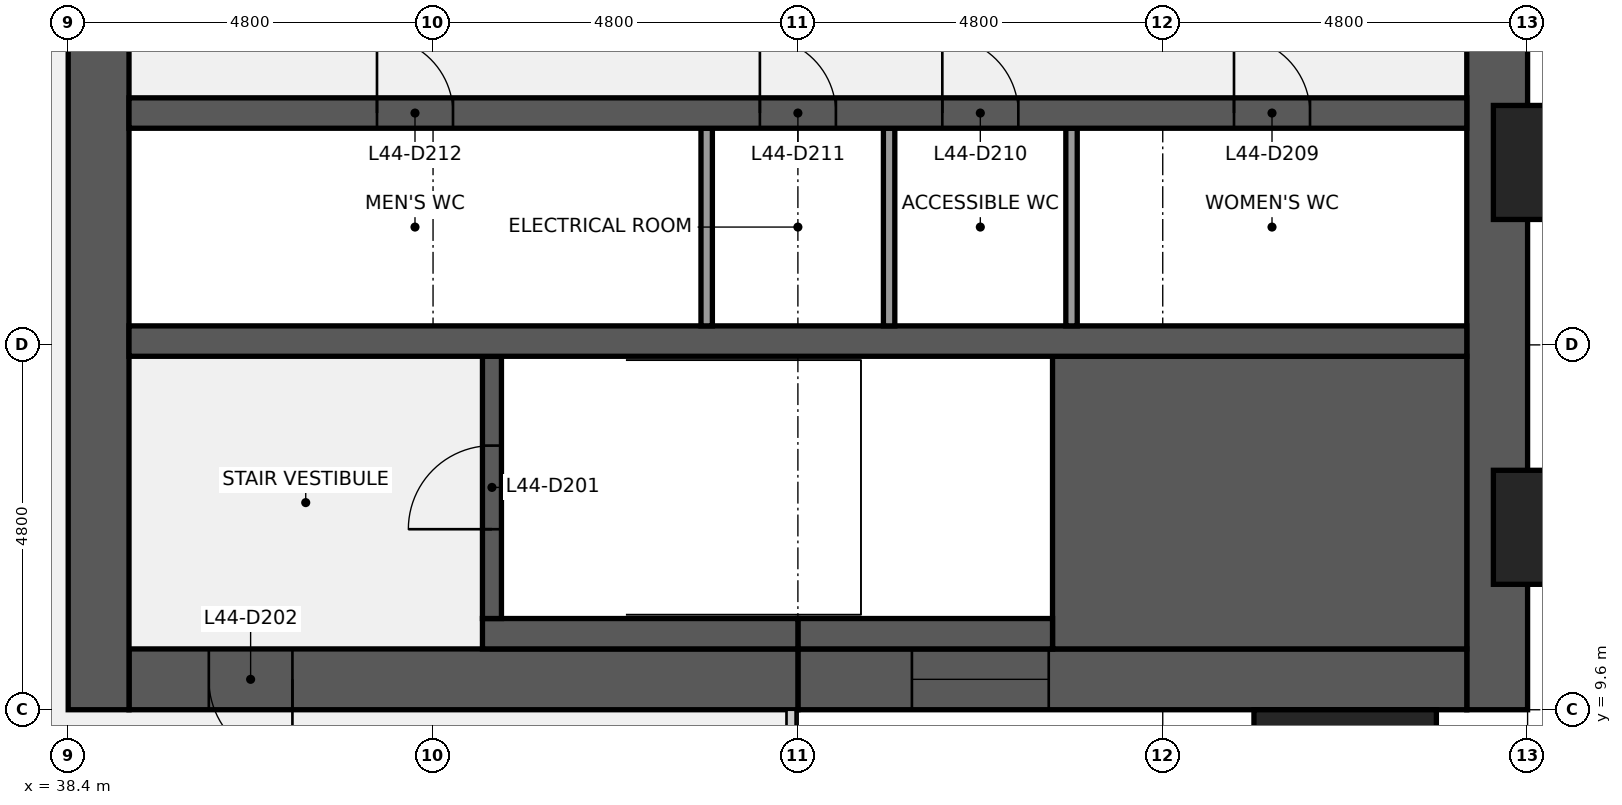
"""IFC4 building model, lengths in metres.
Left out: names, types, materials, properties, quantities, classifications, styles, units other than length and angle.
Written with IfcOpenShell. Run it as: python <this file> out.ifc"""

import sys

from ifc_helpers import new_model, si_unit, direction, frame, frame_2d, origin, origin_2d, place, context, subcontext, project, spatial, rectangle, extrude, element, fill, save


model = new_model("IFC4")
c1 = context("Model", 3, precision=1e-05, world=origin(), true_north=direction((0.0, 1.0)))
c2 = subcontext(c1, "Body", "Model", "MODEL_VIEW")
j1 = project(units=[si_unit("LENGTHUNIT", "METRE"), si_unit("PLANEANGLEUNIT", "RADIAN")], contexts=[c1])
p1 = place(None, origin())
s1 = spatial("IfcSite", under=j1, at=p1, CompositionType="ELEMENT")
p2 = place(p1, origin())
s2 = spatial("IfcBuilding", under=s1, at=p2, CompositionType="ELEMENT")
p3 = place(p2, frame((0.0, 0.0, 205.2)))
s3 = spatial("IfcBuildingStorey", under=s2, at=p3, CompositionType="ELEMENT", Elevation=205.2)
p4 = place(p3, frame((57.2, 38.4, 0.0), z_axis=(0.0, 0.0, 1.0), x_axis=(0.0, -1.0, 0.0)))
e1 = element("IfcWall", 1, at=p4, inside=s3, PredefinedType="SHEAR", context=c2, shape_type="SweptSolid", body=[
    extrude(rectangle(XDim=28.8, YDim=0.8, at=frame_2d((14.4, 0.0))), origin(), (0.0, 0.0, 1.0), 3.84),
])
p5 = place(p4, frame((18.45, 0.0, 0.9)))
e2 = element("IfcOpeningElement", 2, at=p5, cuts=e1, PredefinedType="OPENING", context=c2, shape_type="SweptSolid", body=[
    extrude(rectangle(XDim=1.5, YDim=1.5, at=frame_2d((0.75, 0.75))), frame((0.0, 0.41, 0.0), z_axis=(0.0, -1.0, 0.0), x_axis=(1.0, 0.0, 0.0)), (0.0, 0.0, 1.0), 0.82),
])
p6 = place(p4, frame((8.85, 0.0, 0.9)))
e3 = element("IfcOpeningElement", 3, at=p6, cuts=e1, PredefinedType="OPENING", context=c2, shape_type="SweptSolid", body=[
    extrude(rectangle(XDim=1.5, YDim=1.5, at=frame_2d((0.75, 0.75))), frame((0.0, 0.41, 0.0), z_axis=(0.0, -1.0, 0.0), x_axis=(1.0, 0.0, 0.0)), (0.0, 0.0, 1.0), 0.82),
])
p7 = place(p3, frame((56.8, 10.0, 0.0), z_axis=(0.0, 0.0, 1.0), x_axis=(-1.0, 0.0, 0.0)))
e4 = element("IfcWall", 4, at=p7, inside=s3, PredefinedType="SHEAR", context=c2, shape_type="SweptSolid", body=[
    extrude(rectangle(XDim=8.8, YDim=0.8, at=frame_2d((4.4, 0.0))), origin(), (0.0, 0.0, 1.0), 3.84),
])
p8 = place(p7, frame((5.5, 0.0, 0.9)))
e5 = element("IfcOpeningElement", 5, at=p8, cuts=e4, PredefinedType="OPENING", context=c2, shape_type="SweptSolid", body=[
    extrude(rectangle(XDim=1.8, YDim=1.5, at=frame_2d((0.9, 0.75))), frame((0.0, 0.41, 0.0), z_axis=(0.0, -1.0, 0.0), x_axis=(1.0, 0.0, 0.0)), (0.0, 0.0, 1.0), 0.82),
])
p9 = place(p3, frame((48.0, 10.0, 0.0), z_axis=(0.0, 0.0, 1.0), x_axis=(-1.0, 0.0, 0.0)))
e6 = element("IfcWall", 6, at=p9, inside=s3, PredefinedType="SHEAR", context=c2, shape_type="SweptSolid", body=[
    extrude(rectangle(XDim=8.8, YDim=0.8, at=frame_2d((4.4, 0.0))), origin(), (0.0, 0.0, 1.0), 3.84),
])
p10 = place(p9, frame((6.65, 0.0, 0.0)))
e7 = element("IfcOpeningElement", 7, at=p10, cuts=e6, PredefinedType="OPENING", context=c2, shape_type="SweptSolid", body=[
    extrude(rectangle(XDim=1.1, YDim=2.1, at=frame_2d((0.55, 1.05))), frame((0.0, 0.41, 0.0), z_axis=(0.0, -1.0, 0.0), x_axis=(1.0, 0.0, 0.0)), (0.0, 0.0, 1.0), 0.82),
])
p11 = place(p3, frame((38.8, 9.6, 0.0), z_axis=(0.0, 0.0, 1.0), x_axis=(0.0, 1.0, 0.0)))
e8 = element("IfcWall", 8, at=p11, inside=s3, PredefinedType="SHEAR", context=c2, shape_type="SweptSolid", body=[
    extrude(rectangle(XDim=28.8, YDim=0.8, at=frame_2d((14.4, 0.0))), origin(), (0.0, 0.0, 1.0), 3.84),
])
p12 = place(p11, frame((8.7, 0.0, 0.0)))
e9 = element("IfcOpeningElement", 9, at=p12, cuts=e8, PredefinedType="OPENING", context=c2, shape_type="SweptSolid", body=[
    extrude(rectangle(XDim=1.8, YDim=2.1, at=frame_2d((0.9, 1.05))), frame((0.0, 0.41, 0.0), z_axis=(0.0, -1.0, 0.0), x_axis=(1.0, 0.0, 0.0)), (0.0, 0.0, 1.0), 0.82),
])
p13 = place(p11, frame((18.3, 0.0, 0.0)))
e10 = element("IfcOpeningElement", 10, at=p13, cuts=e8, PredefinedType="OPENING", context=c2, shape_type="SweptSolid", body=[
    extrude(rectangle(XDim=1.8, YDim=2.1, at=frame_2d((0.9, 1.05))), frame((0.0, 0.41, 0.0), z_axis=(0.0, -1.0, 0.0), x_axis=(1.0, 0.0, 0.0)), (0.0, 0.0, 1.0), 0.82),
])
p14 = place(p3, frame((51.35, 12.325, 0.0), z_axis=(0.0, 0.0, 1.0), x_axis=(1.0, 0.0, 0.0)))
e11 = element("IfcWall", 11, at=p14, inside=s3, PredefinedType="SHEAR", context=c2, shape_type="SweptSolid", body=[
    extrude(rectangle(XDim=5.45, YDim=3.85, at=frame_2d((2.725, 0.0))), origin(), (0.0, 0.0, 1.0), 3.84),
])
p15 = place(p3, frame((48.0, 10.6, 0.0), z_axis=(0.0, 0.0, 1.0), x_axis=(1.0, 0.0, 0.0)))
e12 = element("IfcWall", 12, at=p15, inside=s3, PredefinedType="SHEAR", context=c2, shape_type="SweptSolid", body=[
    extrude(rectangle(XDim=3.35, YDim=0.4, at=frame_2d((1.675, 0.0))), origin(), (0.0, 0.0, 1.0), 3.84),
])
p16 = place(p3, frame((43.85, 10.6, 0.0), z_axis=(0.0, 0.0, 1.0), x_axis=(1.0, 0.0, 0.0)))
e13 = element("IfcWall", 13, at=p16, inside=s3, PredefinedType="SHEAR", context=c2, shape_type="SweptSolid", body=[
    extrude(rectangle(XDim=4.15, YDim=0.4, at=frame_2d((2.075, 0.0))), origin(), (0.0, 0.0, 1.0), 3.84),
])
p17 = place(p3, frame((43.975, 10.8, 0.0), z_axis=(0.0, 0.0, 1.0), x_axis=(0.0, 1.0, 0.0)))
e14 = element("IfcWall", 14, at=p17, inside=s3, PredefinedType="SHEAR", context=c2, shape_type="SweptSolid", body=[
    extrude(rectangle(XDim=3.45, YDim=0.25, at=frame_2d((1.725, 0.0))), origin(), (0.0, 0.0, 1.0), 3.84),
])
p18 = place(p17, frame((1.175, 0.0, 0.0)))
e15 = element("IfcOpeningElement", 15, at=p18, cuts=e14, PredefinedType="OPENING", context=c2, shape_type="SweptSolid", body=[
    extrude(rectangle(XDim=1.1, YDim=2.1, at=frame_2d((0.55, 1.05))), frame((0.0, 0.135, 0.0), z_axis=(0.0, -1.0, 0.0), x_axis=(1.0, 0.0, 0.0)), (0.0, 0.0, 1.0), 0.27),
])
p19 = place(p3, frame((39.2, 14.45, 0.0), z_axis=(0.0, 0.0, 1.0), x_axis=(1.0, 0.0, 0.0)))
e16 = element("IfcWall", 16, at=p19, inside=s3, PredefinedType="SHEAR", context=c2, shape_type="SweptSolid", body=[
    extrude(rectangle(XDim=17.6, YDim=0.4, at=frame_2d((8.8, 0.0))), origin(), (0.0, 0.0, 1.0), 3.84),
])
for number, where, z_axis, x_axis in (
    (17, (51.6, 14.65, 0.0), (0.0, 0.0, 1.0), (0.0, 1.0, 0.0)),
    (18, (49.2, 14.65, 0.0), (0.0, 0.0, 1.0), (0.0, 1.0, 0.0)),
    (19, (46.8, 14.65, 0.0), (0.0, 0.0, 1.0), (0.0, 1.0, 0.0)),
):
    element("IfcWall", number, at=place(p3, frame(where, z_axis=z_axis, x_axis=x_axis)), inside=s3, PredefinedType="PARTITIONING", context=c2, shape_type="SweptSolid", body=[
        extrude(rectangle(XDim=2.6, YDim=0.15, at=frame_2d((1.3, 0.0))), origin(), (0.0, 0.0, 1.0), 3.84),
    ])
p20 = place(p3, frame((39.2, 17.45, 0.0), z_axis=(0.0, 0.0, 1.0), x_axis=(1.0, 0.0, 0.0)))
e20 = element("IfcWall", 20, at=p20, inside=s3, PredefinedType="SHEAR", context=c2, shape_type="SweptSolid", body=[
    extrude(rectangle(XDim=17.6, YDim=0.4, at=frame_2d((8.8, 0.0))), origin(), (0.0, 0.0, 1.0), 3.84),
])
p21 = place(p20, frame((14.538, 0.0, 0.0)))
e21 = element("IfcOpeningElement", 21, at=p21, cuts=e20, PredefinedType="OPENING", context=c2, shape_type="SweptSolid", body=[
    extrude(rectangle(XDim=1.0, YDim=2.1, at=frame_2d((0.5, 1.05))), frame((0.0, 0.21, 0.0), z_axis=(0.0, -1.0, 0.0), x_axis=(1.0, 0.0, 0.0)), (0.0, 0.0, 1.0), 0.42),
])
p22 = place(p20, frame((10.7, 0.0, 0.0)))
e22 = element("IfcOpeningElement", 22, at=p22, cuts=e20, PredefinedType="OPENING", context=c2, shape_type="SweptSolid", body=[
    extrude(rectangle(XDim=1.0, YDim=2.1, at=frame_2d((0.5, 1.05))), frame((0.0, 0.21, 0.0), z_axis=(0.0, -1.0, 0.0), x_axis=(1.0, 0.0, 0.0)), (0.0, 0.0, 1.0), 0.42),
])
p23 = place(p20, frame((8.3, 0.0, 0.0)))
e23 = element("IfcOpeningElement", 23, at=p23, cuts=e20, PredefinedType="OPENING", context=c2, shape_type="SweptSolid", body=[
    extrude(rectangle(XDim=1.0, YDim=2.1, at=frame_2d((0.5, 1.05))), frame((0.0, 0.21, 0.0), z_axis=(0.0, -1.0, 0.0), x_axis=(1.0, 0.0, 0.0)), (0.0, 0.0, 1.0), 0.42),
])
p24 = place(p20, frame((3.262, 0.0, 0.0)))
e24 = element("IfcOpeningElement", 24, at=p24, cuts=e20, PredefinedType="OPENING", context=c2, shape_type="SweptSolid", body=[
    extrude(rectangle(XDim=1.0, YDim=2.1, at=frame_2d((0.5, 1.05))), frame((0.0, 0.21, 0.0), z_axis=(0.0, -1.0, 0.0), x_axis=(1.0, 0.0, 0.0)), (0.0, 0.0, 1.0), 0.42),
])
for number, where, z_axis, x_axis in (
    (25, (55.2, 8.85, 0.0), (0.0, 0.0, 1.0), (1.0, 0.0, 0.0)),
    (26, (58.35, 12.0, 0.0), (0.0, 0.0, 1.0), (0.0, 1.0, 0.0)),
    (27, (58.35, 16.8, 0.0), (0.0, 0.0, 1.0), (0.0, 1.0, 0.0)),
):
    element("IfcColumn", number, at=place(p3, frame(where, z_axis=z_axis, x_axis=x_axis)), inside=s3, PredefinedType="PILASTER", context=c2, shape_type="SweptSolid", body=[
        extrude(rectangle(XDim=2.4, YDim=1.5, at=origin_2d()), origin(), (0.0, 0.0, 1.0), 4.0),
    ])
p25 = place(p18, origin())
e28 = element("IfcDoor", 28, at=p25, inside=s3, OperationType="SINGLE_SWING_LEFT", PredefinedType="DOOR", context=c2, shape_type="SweptSolid", body=[
    extrude(rectangle(XDim=1.1, YDim=2.1, at=frame_2d((0.55, 1.05))), frame((0.0, 0.025, 0.0), z_axis=(0.0, -1.0, 0.0), x_axis=(1.0, 0.0, 0.0)), (0.0, 0.0, 1.0), 0.05),
])
fill(e15, e28)
p26 = place(p10, origin())
e29 = element("IfcDoor", 29, at=p26, inside=s3, OperationType="SINGLE_SWING_LEFT", PredefinedType="DOOR", context=c2, shape_type="SweptSolid", body=[
    extrude(rectangle(XDim=1.1, YDim=2.1, at=frame_2d((0.55, 1.05))), frame((0.0, 0.025, 0.0), z_axis=(0.0, -1.0, 0.0), x_axis=(1.0, 0.0, 0.0)), (0.0, 0.0, 1.0), 0.05),
])
fill(e7, e29)
p27 = place(p21, origin())
e30 = element("IfcDoor", 30, at=p27, inside=s3, OperationType="SINGLE_SWING_LEFT", PredefinedType="DOOR", context=c2, shape_type="SweptSolid", body=[
    extrude(rectangle(XDim=1.0, YDim=2.1, at=frame_2d((0.5, 1.05))), frame((0.0, 0.025, 0.0), z_axis=(0.0, -1.0, 0.0), x_axis=(1.0, 0.0, 0.0)), (0.0, 0.0, 1.0), 0.05),
])
fill(e21, e30)
p28 = place(p22, origin())
e31 = element("IfcDoor", 31, at=p28, inside=s3, OperationType="SINGLE_SWING_LEFT", PredefinedType="DOOR", context=c2, shape_type="SweptSolid", body=[
    extrude(rectangle(XDim=1.0, YDim=2.1, at=frame_2d((0.5, 1.05))), frame((0.0, 0.025, 0.0), z_axis=(0.0, -1.0, 0.0), x_axis=(1.0, 0.0, 0.0)), (0.0, 0.0, 1.0), 0.05),
])
fill(e22, e31)
p29 = place(p23, origin())
e32 = element("IfcDoor", 32, at=p29, inside=s3, OperationType="SINGLE_SWING_LEFT", PredefinedType="DOOR", context=c2, shape_type="SweptSolid", body=[
    extrude(rectangle(XDim=1.0, YDim=2.1, at=frame_2d((0.5, 1.05))), frame((0.0, 0.025, 0.0), z_axis=(0.0, -1.0, 0.0), x_axis=(1.0, 0.0, 0.0)), (0.0, 0.0, 1.0), 0.05),
])
fill(e23, e32)
p30 = place(p24, origin())
e33 = element("IfcDoor", 33, at=p30, inside=s3, OperationType="SINGLE_SWING_LEFT", PredefinedType="DOOR", context=c2, shape_type="SweptSolid", body=[
    extrude(rectangle(XDim=1.0, YDim=2.1, at=frame_2d((0.5, 1.05))), frame((0.0, 0.025, 0.0), z_axis=(0.0, -1.0, 0.0), x_axis=(1.0, 0.0, 0.0)), (0.0, 0.0, 1.0), 0.05),
])
fill(e24, e33)
p31 = place(p8, origin())
e34 = element("IfcWindow", 34, at=p31, inside=s3, PartitioningType="SINGLE_PANEL", PredefinedType="WINDOW", context=c2, shape_type="SweptSolid", body=[
    extrude(rectangle(XDim=1.8, YDim=1.5, at=frame_2d((0.9, 0.75))), frame((0.0, 0.03, 0.0), z_axis=(0.0, -1.0, 0.0), x_axis=(1.0, 0.0, 0.0)), (0.0, 0.0, 1.0), 0.06),
])
fill(e5, e34)
save(model, sys.argv[1])
